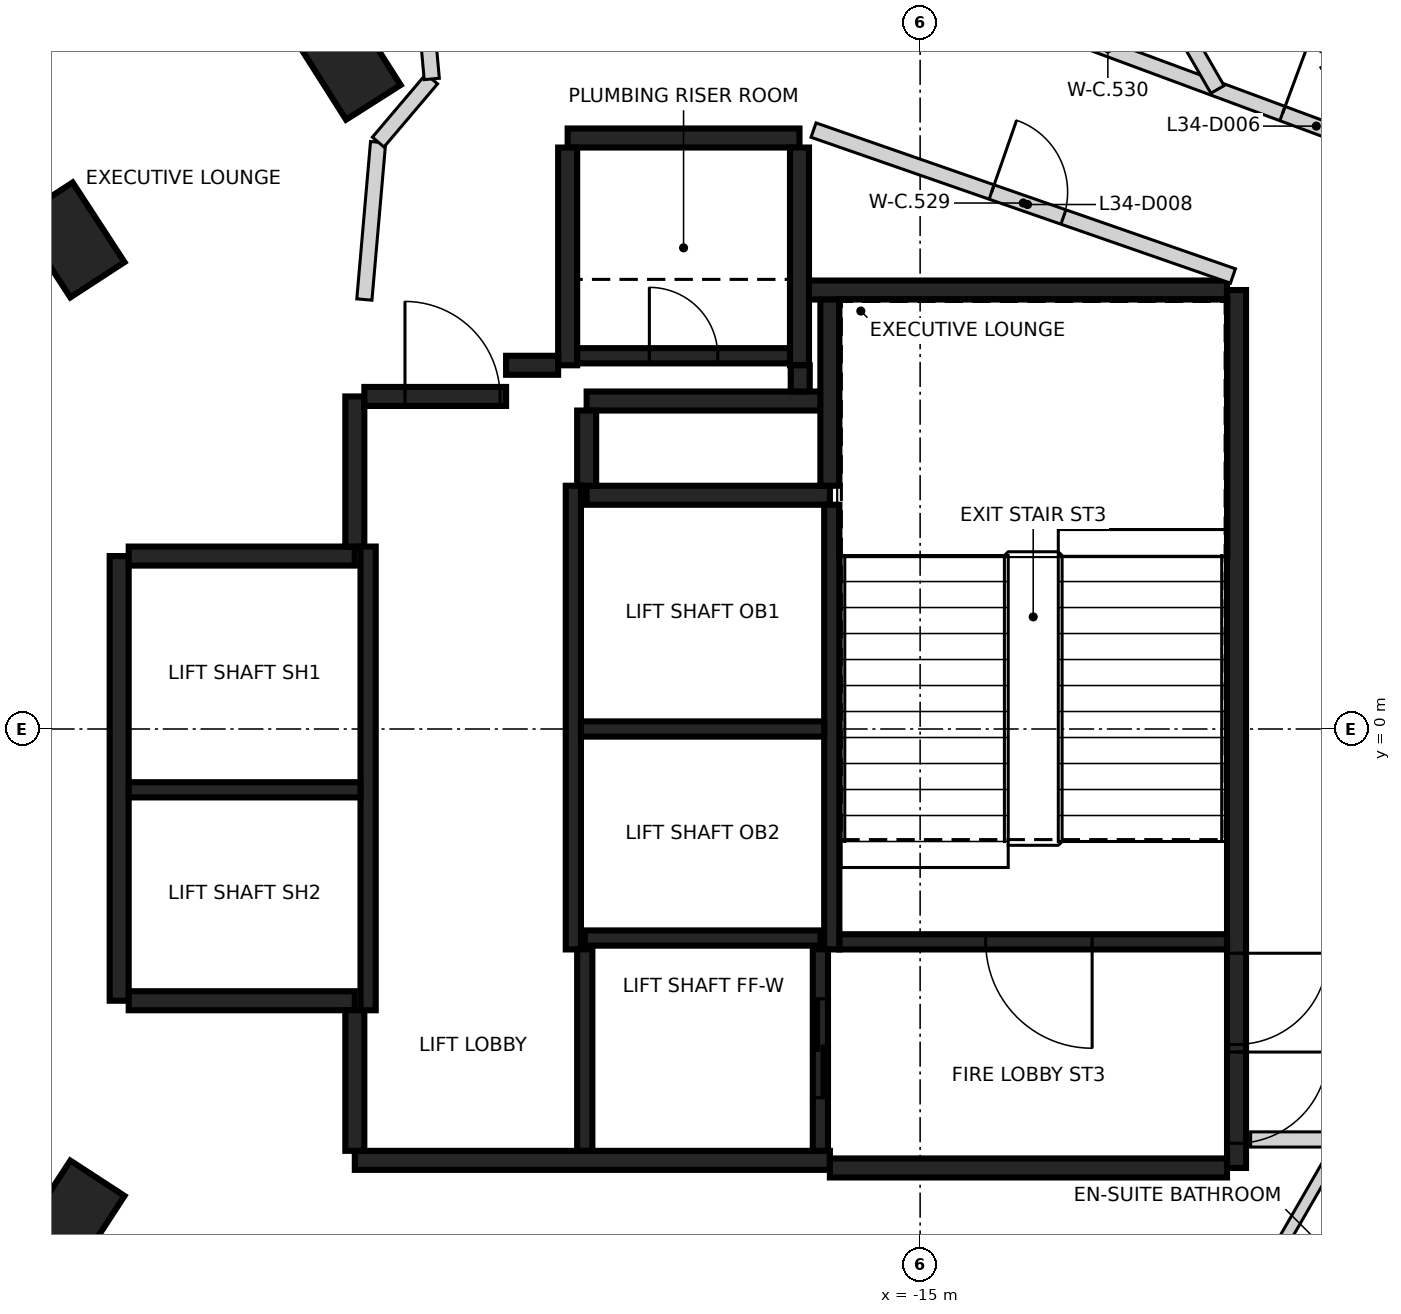
"""IFC4 building model, lengths in metres.
Left out: names, types, materials, properties, quantities, classifications, styles, units other than length and angle.
Written with IfcOpenShell. Run it as: python <this file> out.ifc"""

import sys

from ifc_helpers import new_model, si_unit, direction, frame, frame_2d, origin, origin_2d, place, context, subcontext, project, spatial, rectangle, extrude, element, fill, save


model = new_model("IFC4")
c1 = context("Model", 3, precision=1e-05, world=origin(), true_north=direction((0.0, 1.0)))
c2 = subcontext(c1, "Body", "Model", "MODEL_VIEW")
j1 = project(units=[si_unit("LENGTHUNIT", "METRE"), si_unit("PLANEANGLEUNIT", "RADIAN")], contexts=[c1])
p1 = place(None, origin())
s1 = spatial("IfcSite", under=j1, at=p1, CompositionType="ELEMENT")
p2 = place(p1, origin())
s2 = spatial("IfcBuilding", under=s1, at=p2, CompositionType="ELEMENT")
p3 = place(p2, frame((0.0, 0.0, 139.6)))
s3 = spatial("IfcBuildingStorey", under=s2, at=p3, CompositionType="ELEMENT", Elevation=139.6)
for number, where, z_axis, x_axis in (
    (1, (-22.529, 8.772, -0.4), (0.0, 0.0, 1.0), (-0.536, 0.844, 0.0)),
    (2, (-26.165, 6.434, -0.4), (0.0, 0.0, 1.0), (-0.546, 0.838, 0.0)),
    (3, (-26.165, -6.434, -0.4), (0.0, 0.0, 1.0), (0.546, 0.838, 0.0)),
):
    element("IfcColumn", number, at=place(p3, frame(where, z_axis=z_axis, x_axis=x_axis)), inside=s3, PredefinedType="COLUMN", context=c2, shape_type="SweptSolid", body=[
        extrude(rectangle(XDim=1.25, YDim=0.85, at=origin_2d()), origin(), (0.0, 0.0, 1.0), 3.6),
    ])
p4 = place(p3, frame((-10.837, 5.775, 0.0), z_axis=(0.0, 0.0, 1.0), x_axis=(0.0, -1.0, 0.0)))
e4 = element("IfcWall", 4, at=p4, inside=s3, PredefinedType="SHEAR", context=c2, shape_type="SweptSolid", body=[
    extrude(rectangle(XDim=11.55, YDim=0.25, at=frame_2d((5.775, 0.0))), origin(), (0.0, 0.0, 1.0), 3.2),
])
p5 = place(p4, frame((10.025, 0.0, 0.0)))
e5 = element("IfcOpeningElement", 5, at=p5, cuts=e4, PredefinedType="OPENING", context=c2, shape_type="SweptSolid", body=[
    extrude(rectangle(XDim=1.2, YDim=2.1, at=frame_2d((0.6, 1.05))), frame((0.0, 0.135, 0.0), z_axis=(0.0, -1.0, 0.0), x_axis=(1.0, 0.0, 0.0)), (0.0, 0.0, 1.0), 0.27),
])
p6 = place(p4, frame((8.725, 0.0, 0.0)))
e6 = element("IfcOpeningElement", 6, at=p6, cuts=e4, PredefinedType="OPENING", context=c2, shape_type="SweptSolid", body=[
    extrude(rectangle(XDim=1.2, YDim=2.1, at=frame_2d((0.6, 1.05))), frame((0.0, 0.135, 0.0), z_axis=(0.0, -1.0, 0.0), x_axis=(1.0, 0.0, 0.0)), (0.0, 0.0, 1.0), 0.27),
])
p7 = place(p3, frame((-16.187, -5.675, 0.0), z_axis=(0.0, 0.0, 1.0), x_axis=(-1.0, 0.0, 0.0)))
e7 = element("IfcWall", 7, at=p7, inside=s3, PredefinedType="SHEAR", context=c2, shape_type="SweptSolid", body=[
    extrude(rectangle(XDim=6.25, YDim=0.25, at=frame_2d((3.125, 0.0))), origin(), (0.0, 0.0, 1.0), 3.2),
])
p8 = place(p3, frame((-25.537, -3.575, 0.0), z_axis=(0.0, 0.0, 1.0), x_axis=(0.0, 1.0, 0.0)))
e8 = element("IfcWall", 8, at=p8, inside=s3, PredefinedType="SHEAR", context=c2, shape_type="SweptSolid", body=[
    extrude(rectangle(XDim=5.85, YDim=0.25, at=frame_2d((2.925, 0.0))), origin(), (0.0, 0.0, 1.0), 3.2),
])
p9 = place(p3, frame((-10.963, -5.775, 0.0), z_axis=(0.0, 0.0, 1.0), x_axis=(-1.0, 0.0, 0.0)))
e9 = element("IfcWall", 9, at=p9, inside=s3, PredefinedType="SHEAR", context=c2, shape_type="SweptSolid", body=[
    extrude(rectangle(XDim=5.225, YDim=0.25, at=frame_2d((2.612, 0.0))), origin(), (0.0, 0.0, 1.0), 3.2),
])
p10 = place(p3, frame((-16.472, 5.775, 0.0), z_axis=(0.0, 0.0, 1.0), x_axis=(1.0, 0.0, 0.0)))
e10 = element("IfcWall", 10, at=p10, inside=s3, PredefinedType="SHEAR", context=c2, shape_type="SweptSolid", body=[
    extrude(rectangle(XDim=5.51, YDim=0.25, at=frame_2d((2.755, 0.0))), origin(), (0.0, 0.0, 1.0), 3.2),
])
p11 = place(p3, frame((-19.387, 3.075, 0.0), z_axis=(0.0, 0.0, 1.0), x_axis=(1.0, 0.0, 0.0)))
e11 = element("IfcWall", 11, at=p11, inside=s3, PredefinedType="SHEAR", context=c2, shape_type="SweptSolid", body=[
    extrude(rectangle(XDim=3.2, YDim=0.25, at=frame_2d((1.6, 0.0))), origin(), (0.0, 0.0, 1.0), 3.2),
])
for number, where, z_axis, x_axis in (
    (12, (-22.437, -3.575, 0.0), (0.0, 0.0, 1.0), (-1.0, 0.0, 0.0)),
    (13, (-25.412, 2.275, 0.0), (0.0, 0.0, 1.0), (1.0, 0.0, 0.0)),
):
    element("IfcWall", number, at=place(p3, frame(where, z_axis=z_axis, x_axis=x_axis)), inside=s3, PredefinedType="SHEAR", context=c2, shape_type="SweptSolid", body=[
        extrude(rectangle(XDim=2.975, YDim=0.25, at=frame_2d((1.487, 0.0))), origin(), (0.0, 0.0, 1.0), 3.2),
    ])
p12 = place(p3, frame((-19.637, 7.775, 0.0), z_axis=(0.0, 0.0, 1.0), x_axis=(1.0, 0.0, 0.0)))
e14 = element("IfcWall", 14, at=p12, inside=s3, PredefinedType="SHEAR", context=c2, shape_type="SweptSolid", body=[
    extrude(rectangle(XDim=3.05, YDim=0.25, at=frame_2d((1.525, 0.0))), origin(), (0.0, 0.0, 1.0), 3.2),
])
for number, where, z_axis, x_axis in (
    (15, (-16.587, 7.65, 0.0), (0.0, 0.0, 1.0), (0.0, -1.0, 0.0)),
    (16, (-19.637, 4.785, 0.0), (0.0, 0.0, 1.0), (0.0, 1.0, 0.0)),
):
    element("IfcWall", number, at=place(p3, frame(where, z_axis=z_axis, x_axis=x_axis)), inside=s3, PredefinedType="SHEAR", context=c2, shape_type="SweptSolid", body=[
        extrude(rectangle(XDim=2.865, YDim=0.25, at=frame_2d((1.432, 0.0))), origin(), (0.0, 0.0, 1.0), 3.2),
    ])
p13 = place(p3, frame((-16.302, 4.315, 0.0), z_axis=(0.0, 0.0, 1.0), x_axis=(-1.0, 0.0, 0.0)))
e17 = element("IfcWall", 17, at=p13, inside=s3, PredefinedType="SHEAR", context=c2, shape_type="SweptSolid", body=[
    extrude(rectangle(XDim=3.085, YDim=0.25, at=frame_2d((1.542, 0.0))), origin(), (0.0, 0.0, 1.0), 3.2),
])
p14 = place(p3, frame((-16.187, 3.2, 0.0), z_axis=(0.0, 0.0, 1.0), x_axis=(0.0, 1.0, 0.0)))
e18 = element("IfcWall", 18, at=p14, inside=s3, PredefinedType="SHEAR", context=c2, shape_type="SweptSolid", body=[
    extrude(rectangle(XDim=2.449, YDim=0.25, at=frame_2d((1.225, 0.0))), origin(), (0.0, 0.0, 1.0), 3.2),
])
p15 = place(p3, frame((-22.437, 2.4, 0.0), z_axis=(0.0, 0.0, 1.0), x_axis=(0.0, 1.0, 0.0)))
e19 = element("IfcWall", 19, at=p15, inside=s3, PredefinedType="SHEAR", context=c2, shape_type="SweptSolid", body=[
    extrude(rectangle(XDim=1.975, YDim=0.25, at=frame_2d((0.987, 0.0))), origin(), (0.0, 0.0, 1.0), 3.2),
])
p16 = place(p3, frame((-22.437, -5.55, 0.0), z_axis=(0.0, 0.0, 1.0), x_axis=(0.0, 1.0, 0.0)))
e20 = element("IfcWall", 20, at=p16, inside=s3, PredefinedType="SHEAR", context=c2, shape_type="SweptSolid", body=[
    extrude(rectangle(XDim=1.849, YDim=0.25, at=frame_2d((0.925, 0.0))), origin(), (0.0, 0.0, 1.0), 3.2),
])
p17 = place(p3, frame((-22.312, 4.375, 0.0), z_axis=(0.0, 0.0, 1.0), x_axis=(1.0, 0.0, 0.0)))
e21 = element("IfcWall", 21, at=p17, inside=s3, PredefinedType="SHEAR", context=c2, shape_type="SweptSolid", body=[
    extrude(rectangle(XDim=1.865, YDim=0.25, at=frame_2d((0.932, 0.0))), origin(), (0.0, 0.0, 1.0), 3.2),
])
p18 = place(p17, frame((0.535, 0.0, 0.0)))
e22 = element("IfcOpeningElement", 22, at=p18, cuts=e21, PredefinedType="OPENING", context=c2, shape_type="SweptSolid", body=[
    extrude(rectangle(XDim=1.25, YDim=2.1, at=frame_2d((0.625, 1.05))), frame((0.0, 0.135, 0.0), z_axis=(0.0, -1.0, 0.0), x_axis=(1.0, 0.0, 0.0)), (0.0, 0.0, 1.0), 0.27),
])
p19 = place(p3, frame((-19.387, 4.19, 0.0), z_axis=(0.0, 0.0, 1.0), x_axis=(0.0, -1.0, 0.0)))
e23 = element("IfcWall", 23, at=p19, inside=s3, PredefinedType="SHEAR", context=c2, shape_type="SweptSolid", body=[
    extrude(rectangle(XDim=0.989, YDim=0.25, at=frame_2d((0.495, 0.0))), origin(), (0.0, 0.0, 1.0), 3.2),
])
p20 = place(p3, frame((-20.447, 4.785, 0.0), z_axis=(0.0, 0.0, 1.0), x_axis=(1.0, 0.0, 0.0)))
e24 = element("IfcWall", 24, at=p20, inside=s3, PredefinedType="SHEAR", context=c2, shape_type="SweptSolid", body=[
    extrude(rectangle(XDim=0.685, YDim=0.25, at=frame_2d((0.342, 0.0))), origin(), (0.0, 0.0, 1.0), 3.2),
])
p21 = place(p3, frame((-16.577, 4.785, 0.0), z_axis=(0.0, 0.0, 1.0), x_axis=(0.0, -1.0, 0.0)))
e25 = element("IfcWall", 25, at=p21, inside=s3, PredefinedType="SHEAR", context=c2, shape_type="SweptSolid", body=[
    extrude(rectangle(XDim=0.344, YDim=0.25, at=frame_2d((0.172, 0.0))), origin(), (0.0, 0.0, 1.0), 3.2),
])
p22 = place(p3, frame((-16.162, 2.951, 0.0), z_axis=(0.0, 0.0, 1.0), x_axis=(0.0, -1.0, 0.0)))
e26 = element("IfcWall", 26, at=p22, inside=s3, PredefinedType="SHEAR", context=c2, shape_type="SweptSolid", body=[
    extrude(rectangle(XDim=5.851, YDim=0.2, at=frame_2d((2.925, 0.0))), origin(), (0.0, 0.0, 1.0), 3.2),
])
for number, where, z_axis, x_axis in (
    (27, (-19.562, -2.9, 0.0), (0.0, 0.0, 1.0), (0.0, 1.0, 0.0)),
    (28, (-22.262, 2.4, 0.0), (0.0, 0.0, 1.0), (0.0, -1.0, 0.0)),
):
    element("IfcWall", number, at=place(p3, frame(where, z_axis=z_axis, x_axis=x_axis)), inside=s3, PredefinedType="SHEAR", context=c2, shape_type="SweptSolid", body=[
        extrude(rectangle(XDim=6.1, YDim=0.2, at=frame_2d((3.05, 0.0))), origin(), (0.0, 0.0, 1.0), 3.2),
    ])
p23 = place(p3, frame((-10.963, -2.8, 0.0), z_axis=(0.0, 0.0, 1.0), x_axis=(-1.0, 0.0, 0.0)))
e29 = element("IfcWall", 29, at=p23, inside=s3, PredefinedType="SHEAR", context=c2, shape_type="SweptSolid", body=[
    extrude(rectangle(XDim=5.098, YDim=0.2, at=frame_2d((2.549, 0.0))), origin(), (0.0, 0.0, 1.0), 3.2),
])
p24 = place(p23, frame((1.774, 0.0, 0.0)))
e30 = element("IfcOpeningElement", 30, at=p24, cuts=e29, PredefinedType="OPENING", context=c2, shape_type="SweptSolid", body=[
    extrude(rectangle(XDim=1.4, YDim=2.1, at=frame_2d((0.7, 1.05))), frame((0.0, 0.11, 0.0), z_axis=(0.0, -1.0, 0.0), x_axis=(1.0, 0.0, 0.0)), (0.0, 0.0, 1.0), 0.22),
])
p25 = place(p3, frame((-16.263, 0.0, 0.0), z_axis=(0.0, 0.0, 1.0), x_axis=(-1.0, 0.0, 0.0)))
e31 = element("IfcWall", 31, at=p25, inside=s3, PredefinedType="SHEAR", context=c2, shape_type="SweptSolid", body=[
    extrude(rectangle(XDim=3.198, YDim=0.2, at=frame_2d((1.599, 0.0))), origin(), (0.0, 0.0, 1.0), 3.2),
])
p26 = place(p3, frame((-22.363, -0.8, 0.0), z_axis=(0.0, 0.0, 1.0), x_axis=(-1.0, 0.0, 0.0)))
e32 = element("IfcWall", 32, at=p26, inside=s3, PredefinedType="SHEAR", context=c2, shape_type="SweptSolid", body=[
    extrude(rectangle(XDim=3.048, YDim=0.2, at=frame_2d((1.524, 0.0))), origin(), (0.0, 0.0, 1.0), 3.2),
])
p27 = place(p3, frame((-19.511, 4.91, 0.0), z_axis=(0.0, 0.0, 1.0), x_axis=(1.0, 0.0, 0.0)))
e33 = element("IfcWall", 33, at=p27, inside=s3, PredefinedType="SHEAR", context=c2, shape_type="SweptSolid", body=[
    extrude(rectangle(XDim=2.798, YDim=0.2, at=frame_2d((1.399, 0.0))), origin(), (0.0, 0.0, 1.0), 3.2),
])
p28 = place(p27, frame((0.949, 0.0, 0.0)))
e34 = element("IfcOpeningElement", 34, at=p28, cuts=e33, PredefinedType="OPENING", context=c2, shape_type="SweptSolid", body=[
    extrude(rectangle(XDim=0.9, YDim=2.1, at=frame_2d((0.45, 1.05))), frame((0.0, 0.11, 0.0), z_axis=(0.0, -1.0, 0.0), x_axis=(1.0, 0.0, 0.0)), (0.0, 0.0, 1.0), 0.22),
])
p29 = place(p3, frame((-19.412, -2.75, 0.0), z_axis=(0.0, 0.0, 1.0), x_axis=(1.0, 0.0, 0.0)))
e35 = element("IfcWall", 35, at=p29, inside=s3, PredefinedType="SHEAR", context=c2, shape_type="SweptSolid", body=[
    extrude(rectangle(XDim=3.1, YDim=0.2, at=frame_2d((1.55, 0.0))), origin(), (0.0, 0.0, 1.0), 3.2),
])
p30 = place(p3, frame((-16.312, -2.898, 0.0), z_axis=(0.0, 0.0, 1.0), x_axis=(0.0, -1.0, 0.0)))
e36 = element("IfcWall", 36, at=p30, inside=s3, PredefinedType="SHEAR", context=c2, shape_type="SweptSolid", body=[
    extrude(rectangle(XDim=2.651, YDim=0.2, at=frame_2d((1.325, 0.0))), origin(), (0.0, 0.0, 1.0), 3.2),
])
p31 = place(p30, frame((0.652, 0.0, 0.0)))
e37 = element("IfcOpeningElement", 37, at=p31, cuts=e36, PredefinedType="OPENING", context=c2, shape_type="SweptSolid", body=[
    extrude(rectangle(XDim=1.3, YDim=2.1, at=frame_2d((0.65, 1.05))), frame((0.0, 0.11, 0.0), z_axis=(0.0, -1.0, 0.0), x_axis=(1.0, 0.0, 0.0)), (0.0, 0.0, 1.0), 0.22),
])
p32 = place(p3, frame((-19.412, -5.549, 0.0), z_axis=(0.0, 0.0, 1.0), x_axis=(0.0, 1.0, 0.0)))
e38 = element("IfcWall", 38, at=p32, inside=s3, PredefinedType="SHEAR", context=c2, shape_type="SweptSolid", body=[
    extrude(rectangle(XDim=2.651, YDim=0.2, at=frame_2d((1.325, 0.0))), origin(), (0.0, 0.0, 1.0), 3.2),
])
p33 = place(p3, frame((-22.131, 7.72, 0.0), z_axis=(0.0, 0.0, 1.0), x_axis=(-0.086827346826, -0.996223374471, 0.0)))
e39 = element("IfcWall", 39, at=p33, inside=s3, PredefinedType="PARTITIONING", context=c2, shape_type="SweptSolid", body=[
    extrude(rectangle(XDim=2.078, YDim=0.2, at=frame_2d((1.039, 0.0))), origin(), (0.0, 0.0, 1.0), 3.2),
])
p34 = place(p3, frame((-22.13, 7.721, 0.0), z_axis=(0.0, 0.0, 1.0), x_axis=(0.646815590698, 0.762646439466, 0.0)))
e40 = element("IfcWall", 40, at=p34, inside=s3, PredefinedType="PARTITIONING", context=c2, shape_type="SweptSolid", body=[
    extrude(rectangle(XDim=1.09, YDim=0.2, at=frame_2d((0.545, 0.0))), origin(), (0.0, 0.0, 1.0), 3.2),
])
p35 = place(p3, frame((-21.521, 9.614, 0.0), z_axis=(0.0, 0.0, 1.0), x_axis=(0.089978363699, -0.995943720331, 0.0)))
e41 = element("IfcWall", 41, at=p35, inside=s3, PredefinedType="PARTITIONING", context=c2, shape_type="SweptSolid", body=[
    extrude(rectangle(XDim=1.066, YDim=0.2, at=frame_2d((0.533, 0.0))), origin(), (0.0, 0.0, 1.0), 2.3),
])
p36 = place(p3, frame((-16.402, 7.879, 0.0), z_axis=(0.0, 0.0, 1.0), x_axis=(0.94449961557, -0.328512520596, 0.0)))
e42 = element("IfcWall", 42, at=p36, inside=s3, PredefinedType="PARTITIONING", context=c2, shape_type="SweptSolid", body=[
    extrude(rectangle(XDim=5.842, YDim=0.2, at=frame_2d((2.921, 0.0))), origin(), (0.0, 0.0, 1.0), 3.2),
])
p37 = place(p36, frame((2.481, 0.0, 0.0)))
e43 = element("IfcOpeningElement", 43, at=p37, cuts=e42, PredefinedType="OPENING", context=c2, shape_type="SweptSolid", body=[
    extrude(rectangle(XDim=1.0, YDim=2.1, at=frame_2d((0.5, 1.05))), frame((0.0, 0.11, 0.0), z_axis=(0.0, -1.0, 0.0), x_axis=(1.0, 0.0, 0.0)), (0.0, 0.0, 1.0), 0.22),
])
p38 = place(p3, frame((-16.026, 10.245, 0.0), z_axis=(0.0, 0.0, 1.0), x_axis=(0.937607706988, -0.347694963721, 0.0)))
e44 = element("IfcWall", 44, at=p38, inside=s3, PredefinedType="PARTITIONING", context=c2, shape_type="SweptSolid", body=[
    extrude(rectangle(XDim=7.458, YDim=0.2, at=frame_2d((3.729, 0.0))), origin(), (0.0, 0.0, 1.0), 3.2),
])
p39 = place(p38, frame((6.179, 0.0, 0.0)))
e45 = element("IfcOpeningElement", 45, at=p39, cuts=e44, PredefinedType="OPENING", context=c2, shape_type="SweptSolid", body=[
    extrude(rectangle(XDim=0.95, YDim=2.1, at=frame_2d((0.475, 1.05))), frame((0.0, 0.11, 0.0), z_axis=(0.0, -1.0, 0.0), x_axis=(1.0, 0.0, 0.0)), (0.0, 0.0, 1.0), 0.22),
])
p40 = place(p38, frame((2.139, 0.0, 0.0)))
e46 = element("IfcOpeningElement", 46, at=p40, cuts=e44, PredefinedType="OPENING", context=c2, shape_type="SweptSolid", body=[
    extrude(rectangle(XDim=1.0, YDim=2.1, at=frame_2d((0.5, 1.05))), frame((0.0, 0.11, 0.0), z_axis=(0.0, -1.0, 0.0), x_axis=(1.0, 0.0, 0.0)), (0.0, 0.0, 1.0), 0.22),
])
p41 = place(p3, frame((-10.652, -5.4, 0.0), z_axis=(0.0, 0.0, 1.0), x_axis=(1.0, 0.0, 0.0)))
e47 = element("IfcWall", 47, at=p41, inside=s3, PredefinedType="PARTITIONING", context=c2, shape_type="SweptSolid", body=[
    extrude(rectangle(XDim=1.205, YDim=0.2, at=frame_2d((0.603, 0.0))), origin(), (0.0, 0.0, 1.0), 3.2),
])
p42 = place(p3, frame((-15.467, 15.998, 0.0), z_axis=(0.0, 0.0, 1.0), x_axis=(0.500003998589, -0.866023095186, 0.0)))
e48 = element("IfcWall", 48, at=p42, inside=s3, PredefinedType="PARTITIONING", context=c2, shape_type="SweptSolid", body=[
    extrude(rectangle(XDim=8.757, YDim=0.2, at=frame_2d((4.379, 0.0))), origin(), (0.0, 0.0, 1.0), 2.3),
])
p43 = place(p3, frame((-10.809, 18.731, 0.0), z_axis=(0.0, 0.0, 1.0), x_axis=(0.500004774777, -0.866022647048, 0.0)))
e49 = element("IfcWall", 49, at=p43, inside=s3, PredefinedType="PARTITIONING", context=c2, shape_type="SweptSolid", body=[
    extrude(rectangle(XDim=12.227, YDim=0.2, at=frame_2d((6.113, 0.0))), origin(), (0.0, 0.0, 1.0), 2.3),
])
p44 = place(p3, frame((-10.946, -7.996, 0.0), z_axis=(0.0, 0.0, 1.0), x_axis=(0.500027927039, 0.866009279501, 0.0)))
e50 = element("IfcWall", 50, at=p44, inside=s3, PredefinedType="PARTITIONING", context=c2, shape_type="SweptSolid", body=[
    extrude(rectangle(XDim=2.998, YDim=0.15, at=frame_2d((1.499, 0.0))), origin(), (0.0, 0.0, 1.0), 3.2),
])
p45 = place(p3, frame((-9.661, 8.74, 0.0), z_axis=(0.0, 0.0, 1.0), x_axis=(0.49990192124, -0.866082022179, 0.0)))
e51 = element("IfcWall", 51, at=p45, inside=s3, PredefinedType="PARTITIONING", context=c2, shape_type="SweptSolid", body=[
    extrude(rectangle(XDim=1.256, YDim=0.15, at=frame_2d((0.628, 0.0))), origin(), (0.0, 0.0, 1.0), 3.2),
])
p46 = place(p31, origin())
e52 = element("IfcDoor", 52, at=p46, inside=s3, OperationType="SLIDING_TO_RIGHT", PredefinedType="DOOR", context=c2, shape_type="SweptSolid", body=[
    extrude(rectangle(XDim=1.3, YDim=2.1, at=frame_2d((0.65, 1.05))), frame((0.0, 0.025, 0.0), z_axis=(0.0, -1.0, 0.0), x_axis=(1.0, 0.0, 0.0)), (0.0, 0.0, 1.0), 0.05),
])
fill(e37, e52)
p47 = place(p18, origin())
e53 = element("IfcDoor", 53, at=p47, inside=s3, OperationType="SINGLE_SWING_LEFT", PredefinedType="DOOR", context=c2, shape_type="SweptSolid", body=[
    extrude(rectangle(XDim=1.25, YDim=2.1, at=frame_2d((0.625, 1.05))), frame((0.0, 0.025, 0.0), z_axis=(0.0, -1.0, 0.0), x_axis=(1.0, 0.0, 0.0)), (0.0, 0.0, 1.0), 0.05),
])
fill(e22, e53)
p48 = place(p5, origin())
e54 = element("IfcDoor", 54, at=p48, inside=s3, OperationType="SINGLE_SWING_LEFT", PredefinedType="DOOR", context=c2, shape_type="SweptSolid", body=[
    extrude(rectangle(XDim=1.2, YDim=2.1, at=frame_2d((0.6, 1.05))), frame((0.0, 0.025, 0.0), z_axis=(0.0, -1.0, 0.0), x_axis=(1.0, 0.0, 0.0)), (0.0, 0.0, 1.0), 0.05),
])
fill(e5, e54)
p49 = place(p6, origin())
e55 = element("IfcDoor", 55, at=p49, inside=s3, OperationType="SINGLE_SWING_RIGHT", PredefinedType="DOOR", context=c2, shape_type="SweptSolid", body=[
    extrude(rectangle(XDim=1.2, YDim=2.1, at=frame_2d((0.6, 1.05))), frame((0.0, 0.025, 0.0), z_axis=(0.0, -1.0, 0.0), x_axis=(1.0, 0.0, 0.0)), (0.0, 0.0, 1.0), 0.05),
])
fill(e6, e55)
p50 = place(p24, origin())
e56 = element("IfcDoor", 56, at=p50, inside=s3, OperationType="SINGLE_SWING_RIGHT", PredefinedType="DOOR", context=c2, shape_type="SweptSolid", body=[
    extrude(rectangle(XDim=1.4, YDim=2.1, at=frame_2d((0.7, 1.05))), frame((0.0, 0.025, 0.0), z_axis=(0.0, -1.0, 0.0), x_axis=(1.0, 0.0, 0.0)), (0.0, 0.0, 1.0), 0.05),
])
fill(e30, e56)
p51 = place(p28, origin())
e57 = element("IfcDoor", 57, at=p51, inside=s3, OperationType="SINGLE_SWING_LEFT", PredefinedType="DOOR", context=c2, shape_type="SweptSolid", body=[
    extrude(rectangle(XDim=0.9, YDim=2.1, at=frame_2d((0.45, 1.05))), frame((0.0, 0.025, 0.0), z_axis=(0.0, -1.0, 0.0), x_axis=(1.0, 0.0, 0.0)), (0.0, 0.0, 1.0), 0.05),
])
fill(e34, e57)
p52 = place(p39, origin())
e58 = element("IfcDoor", 58, at=p52, inside=s3, OperationType="SINGLE_SWING_LEFT", PredefinedType="DOOR", context=c2, shape_type="SweptSolid", body=[
    extrude(rectangle(XDim=0.95, YDim=2.1, at=frame_2d((0.475, 1.05))), frame((0.0, 0.025, 0.0), z_axis=(0.0, -1.0, 0.0), x_axis=(1.0, 0.0, 0.0)), (0.0, 0.0, 1.0), 0.05),
])
fill(e45, e58)
p53 = place(p37, frame((1.0, 0.0, 0.0), z_axis=(0.0, 0.0, 1.0), x_axis=(-1.0, 0.0, 0.0)))
e59 = element("IfcDoor", 59, at=p53, inside=s3, OperationType="SINGLE_SWING_LEFT", PredefinedType="DOOR", context=c2, shape_type="SweptSolid", body=[
    extrude(rectangle(XDim=1.0, YDim=2.1, at=frame_2d((0.5, 1.05))), frame((0.0, 0.025, 0.0), z_axis=(0.0, -1.0, 0.0), x_axis=(1.0, 0.0, 0.0)), (0.0, 0.0, 1.0), 0.05),
])
fill(e43, e59)
save(model, sys.argv[1])
